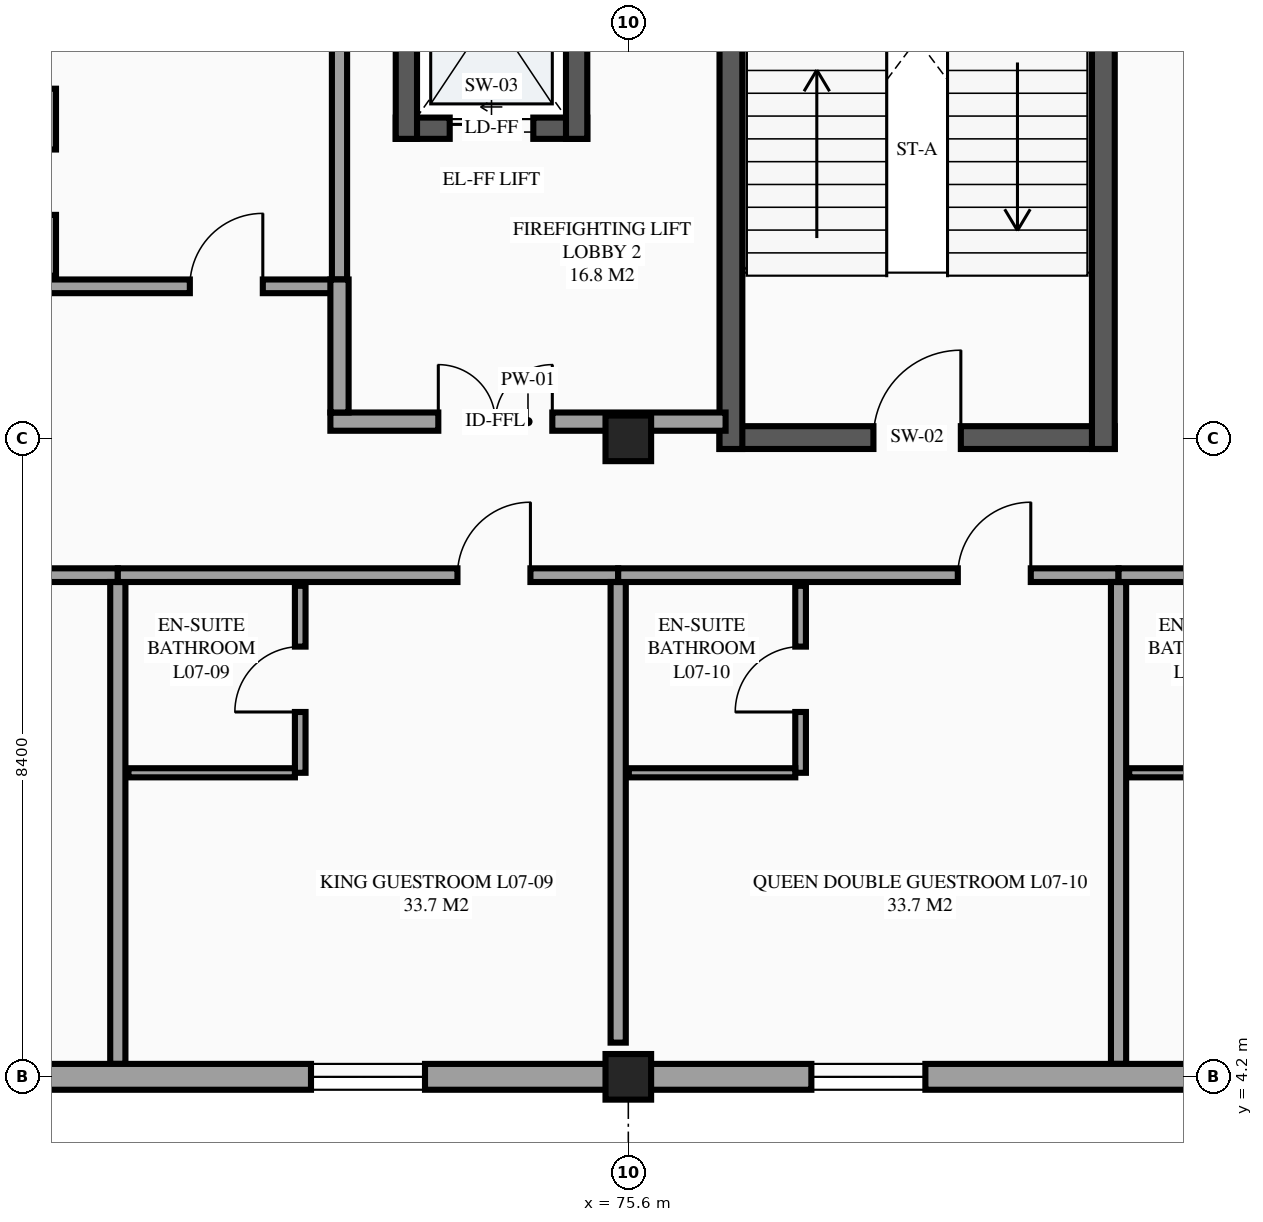
"""IFC4 building model, lengths in metres.
Left out: names, types, materials, properties, quantities, classifications, styles, units other than length and angle.
Written with IfcOpenShell. Run it as: python <this file> out.ifc"""

import sys

from ifc_helpers import new_model, si_unit, direction, frame, frame_2d, origin, origin_2d, place, context, subcontext, project, spatial, rectangle, extrude, element, fill, save


model = new_model("IFC4")
c1 = context("Model", 3, precision=1e-05, world=origin(), true_north=direction((0.0, 1.0)))
c2 = subcontext(c1, "Body", "Model", "MODEL_VIEW")
j1 = project(units=[si_unit("LENGTHUNIT", "METRE"), si_unit("PLANEANGLEUNIT", "RADIAN")], contexts=[c1])
p1 = place(None, origin())
s1 = spatial("IfcSite", under=j1, at=p1, CompositionType="ELEMENT")
p2 = place(p1, origin())
s2 = spatial("IfcBuilding", under=s1, at=p2, CompositionType="ELEMENT")
p3 = place(p2, frame((0.0, 0.0, 29.1)))
s3 = spatial("IfcBuildingStorey", under=s2, at=p3, CompositionType="ELEMENT", Elevation=29.1)
for number, where, z_axis, x_axis in (
    (1, (75.6, 4.2, 0.0), (0.0, 0.0, 1.0), (1.0, 0.0, 0.0)),
    (2, (75.6, 12.6, 0.0), (0.0, 0.0, 1.0), (1.0, 0.0, 0.0)),
):
    element("IfcColumn", number, at=place(p3, frame(where, z_axis=z_axis, x_axis=x_axis)), inside=s3, PredefinedType="COLUMN", context=c2, shape_type="SweptSolid", body=[
        extrude(rectangle(XDim=0.6, YDim=0.6, at=origin_2d()), origin(), (0.0, 0.0, 1.0), 3.6),
    ])
p4 = place(p3, frame((72.54, 16.68, 0.0), z_axis=(0.0, 0.0, 1.0), x_axis=(1.0, 0.0, 0.0)))
e3 = element("IfcWall", 3, at=p4, inside=s3, PredefinedType="SHEAR", context=c2, shape_type="SweptSolid", body=[
    extrude(rectangle(XDim=2.52, YDim=0.28, at=frame_2d((1.26, 0.0))), origin(), (0.0, 0.0, 1.0), 3.6),
])
p5 = place(p4, frame((0.71, 0.0, 0.0)))
e4 = element("IfcOpeningElement", 4, at=p5, cuts=e3, PredefinedType="OPENING", context=c2, shape_type="SweptSolid", body=[
    extrude(rectangle(XDim=1.1, YDim=2.2, at=frame_2d((0.55, 1.1))), frame((0.0, 0.15, 0.0), z_axis=(0.0, -1.0, 0.0), x_axis=(1.0, 0.0, 0.0)), (0.0, 0.0, 1.0), 0.3),
])
for number, where, z_axis, x_axis in (
    (5, (74.92, 16.54, 0.0), (0.0, 0.0, 1.0), (0.0, 1.0, 0.0)),
    (6, (72.68, 19.86, 0.0), (0.0, 0.0, 1.0), (0.0, -1.0, 0.0)),
):
    element("IfcWall", number, at=place(p3, frame(where, z_axis=z_axis, x_axis=x_axis)), inside=s3, PredefinedType="SHEAR", context=c2, shape_type="SweptSolid", body=[
        extrude(rectangle(XDim=3.32, YDim=0.28, at=frame_2d((1.66, 0.0))), origin(), (0.0, 0.0, 1.0), 3.6),
    ])
p6 = place(p3, frame((76.8, 12.61, 0.0), z_axis=(0.0, 0.0, 1.0), x_axis=(1.0, 0.0, 0.0)))
e7 = element("IfcWall", 7, at=p6, inside=s3, PredefinedType="SHEAR", context=c2, shape_type="SweptSolid", body=[
    extrude(rectangle(XDim=5.2, YDim=0.3, at=frame_2d((2.6, 0.0))), origin(), (0.0, 0.0, 1.0), 3.6),
])
p7 = place(p6, frame((2.025, 0.0, 0.0)))
e8 = element("IfcOpeningElement", 8, at=p7, cuts=e7, PredefinedType="OPENING", context=c2, shape_type="SweptSolid", body=[
    extrude(rectangle(XDim=1.15, YDim=2.15, at=frame_2d((0.575, 1.075))), frame((0.0, 0.16, 0.0), z_axis=(0.0, -1.0, 0.0), x_axis=(1.0, 0.0, 0.0)), (0.0, 0.0, 1.0), 0.32),
])
for number, where, z_axis, x_axis in (
    (9, (81.85, 12.46, 0.0), (0.0, 0.0, 1.0), (0.0, 1.0, 0.0)),
    (10, (76.95, 21.3, 0.0), (0.0, 0.0, 1.0), (0.0, -1.0, 0.0)),
):
    element("IfcWall", number, at=place(p3, frame(where, z_axis=z_axis, x_axis=x_axis)), inside=s3, PredefinedType="SHEAR", context=c2, shape_type="SweptSolid", body=[
        extrude(rectangle(XDim=8.84, YDim=0.3, at=frame_2d((4.42, 0.0))), origin(), (0.0, 0.0, 1.0), 3.6),
    ])
p8 = place(p3, frame((62.3, 10.8, 0.0), z_axis=(0.0, 0.0, 1.0), x_axis=(1.0, 0.0, 0.0)))
e11 = element("IfcWall", 11, at=p8, inside=s3, PredefinedType="PARTITIONING", context=c2, shape_type="SweptSolid", body=[
    extrude(rectangle(XDim=6.583, YDim=0.18, at=frame_2d((3.292, 0.0))), origin(), (0.0, 0.0, 1.0), 3.375),
])
p9 = place(p8, frame((3.069, 0.0, 0.0)))
e12 = element("IfcOpeningElement", 12, at=p9, cuts=e11, PredefinedType="OPENING", context=c2, shape_type="SweptSolid", body=[
    extrude(rectangle(XDim=0.96, YDim=2.15, at=frame_2d((0.48, 1.075))), frame((0.0, 0.1, 0.0), z_axis=(0.0, -1.0, 0.0), x_axis=(1.0, 0.0, 0.0)), (0.0, 0.0, 1.0), 0.2),
])
p10 = place(p3, frame((68.883, 4.37, 0.0), z_axis=(0.0, 0.0, 1.0), x_axis=(0.0, 1.0, 0.0)))
e13 = element("IfcWall", 13, at=p10, inside=s3, PredefinedType="PARTITIONING", context=c2, shape_type="SweptSolid", body=[
    extrude(rectangle(XDim=6.34, YDim=0.2, at=frame_2d((3.17, 0.0))), origin(), (0.0, 0.0, 1.0), 3.375),
])
p11 = place(p3, frame((68.883, 10.8, 0.0), z_axis=(0.0, 0.0, 1.0), x_axis=(1.0, 0.0, 0.0)))
e14 = element("IfcWall", 14, at=p11, inside=s3, PredefinedType="PARTITIONING", context=c2, shape_type="SweptSolid", body=[
    extrude(rectangle(XDim=6.583, YDim=0.18, at=frame_2d((3.292, 0.0))), origin(), (0.0, 0.0, 1.0), 3.375),
])
p12 = place(p11, frame((4.469, 0.0, 0.0)))
e15 = element("IfcOpeningElement", 15, at=p12, cuts=e14, PredefinedType="OPENING", context=c2, shape_type="SweptSolid", body=[
    extrude(rectangle(XDim=0.96, YDim=2.15, at=frame_2d((0.48, 1.075))), frame((0.0, 0.1, 0.0), z_axis=(0.0, -1.0, 0.0), x_axis=(1.0, 0.0, 0.0)), (0.0, 0.0, 1.0), 0.2),
])
p13 = place(p3, frame((75.467, 4.65, 0.0), z_axis=(0.0, 0.0, 1.0), x_axis=(0.0, 1.0, 0.0)))
e16 = element("IfcWall", 16, at=p13, inside=s3, PredefinedType="PARTITIONING", context=c2, shape_type="SweptSolid", body=[
    extrude(rectangle(XDim=6.06, YDim=0.2, at=frame_2d((3.03, 0.0))), origin(), (0.0, 0.0, 1.0), 2.78),
])
p14 = place(p3, frame((71.283, 8.2, 0.0), z_axis=(0.0, 0.0, 1.0), x_axis=(0.0, 1.0, 0.0)))
e17 = element("IfcWall", 17, at=p14, inside=s3, PredefinedType="PARTITIONING", context=c2, shape_type="SweptSolid", body=[
    extrude(rectangle(XDim=2.46, YDim=0.14, at=frame_2d((1.23, 0.0))), origin(), (0.0, 0.0, 1.0), 3.375),
])
p15 = place(p14, frame((0.8, 0.0, 0.0)))
e18 = element("IfcOpeningElement", 18, at=p15, cuts=e17, PredefinedType="OPENING", context=c2, shape_type="SweptSolid", body=[
    extrude(rectangle(XDim=0.86, YDim=2.1, at=frame_2d((0.43, 1.05))), frame((0.0, 0.08, 0.0), z_axis=(0.0, -1.0, 0.0), x_axis=(1.0, 0.0, 0.0)), (0.0, 0.0, 1.0), 0.16),
])
p16 = place(p3, frame((69.023, 8.2, 0.0), z_axis=(0.0, 0.0, 1.0), x_axis=(1.0, 0.0, 0.0)))
e19 = element("IfcWall", 19, at=p16, inside=s3, PredefinedType="PARTITIONING", context=c2, shape_type="SweptSolid", body=[
    extrude(rectangle(XDim=2.19, YDim=0.12, at=frame_2d((1.095, 0.0))), origin(), (0.0, 0.0, 1.0), 3.375),
])
p17 = place(p3, frame((75.467, 10.8, 0.0), z_axis=(0.0, 0.0, 1.0), x_axis=(1.0, 0.0, 0.0)))
e20 = element("IfcWall", 20, at=p17, inside=s3, PredefinedType="PARTITIONING", context=c2, shape_type="SweptSolid", body=[
    extrude(rectangle(XDim=6.583, YDim=0.18, at=frame_2d((3.292, 0.0))), origin(), (0.0, 0.0, 1.0), 3.375),
])
p18 = place(p17, frame((4.469, 0.0, 0.0)))
e21 = element("IfcOpeningElement", 21, at=p18, cuts=e20, PredefinedType="OPENING", context=c2, shape_type="SweptSolid", body=[
    extrude(rectangle(XDim=0.96, YDim=2.15, at=frame_2d((0.48, 1.075))), frame((0.0, 0.1, 0.0), z_axis=(0.0, -1.0, 0.0), x_axis=(1.0, 0.0, 0.0)), (0.0, 0.0, 1.0), 0.2),
])
p19 = place(p3, frame((82.05, 4.37, 0.0), z_axis=(0.0, 0.0, 1.0), x_axis=(0.0, 1.0, 0.0)))
e22 = element("IfcWall", 22, at=p19, inside=s3, PredefinedType="PARTITIONING", context=c2, shape_type="SweptSolid", body=[
    extrude(rectangle(XDim=6.34, YDim=0.2, at=frame_2d((3.17, 0.0))), origin(), (0.0, 0.0, 1.0), 3.375),
])
p20 = place(p3, frame((77.867, 8.2, 0.0), z_axis=(0.0, 0.0, 1.0), x_axis=(0.0, 1.0, 0.0)))
e23 = element("IfcWall", 23, at=p20, inside=s3, PredefinedType="PARTITIONING", context=c2, shape_type="SweptSolid", body=[
    extrude(rectangle(XDim=2.46, YDim=0.14, at=frame_2d((1.23, 0.0))), origin(), (0.0, 0.0, 1.0), 3.375),
])
p21 = place(p20, frame((0.8, 0.0, 0.0)))
e24 = element("IfcOpeningElement", 24, at=p21, cuts=e23, PredefinedType="OPENING", context=c2, shape_type="SweptSolid", body=[
    extrude(rectangle(XDim=0.86, YDim=2.1, at=frame_2d((0.43, 1.05))), frame((0.0, 0.08, 0.0), z_axis=(0.0, -1.0, 0.0), x_axis=(1.0, 0.0, 0.0)), (0.0, 0.0, 1.0), 0.16),
])
p22 = place(p3, frame((75.607, 8.2, 0.0), z_axis=(0.0, 0.0, 1.0), x_axis=(1.0, 0.0, 0.0)))
e25 = element("IfcWall", 25, at=p22, inside=s3, PredefinedType="PARTITIONING", context=c2, shape_type="SweptSolid", body=[
    extrude(rectangle(XDim=2.19, YDim=0.12, at=frame_2d((1.095, 0.0))), origin(), (0.0, 0.0, 1.0), 3.375),
])
p23 = place(p3, frame((82.05, 10.8, 0.0), z_axis=(0.0, 0.0, 1.0), x_axis=(1.0, 0.0, 0.0)))
e26 = element("IfcWall", 26, at=p23, inside=s3, PredefinedType="PARTITIONING", context=c2, shape_type="SweptSolid", body=[
    extrude(rectangle(XDim=6.583, YDim=0.18, at=frame_2d((3.292, 0.0))), origin(), (0.0, 0.0, 1.0), 3.375),
])
p24 = place(p23, frame((4.469, 0.0, 0.0)))
e27 = element("IfcOpeningElement", 27, at=p24, cuts=e26, PredefinedType="OPENING", context=c2, shape_type="SweptSolid", body=[
    extrude(rectangle(XDim=0.96, YDim=2.15, at=frame_2d((0.48, 1.075))), frame((0.0, 0.1, 0.0), z_axis=(0.0, -1.0, 0.0), x_axis=(1.0, 0.0, 0.0)), (0.0, 0.0, 1.0), 0.2),
])
p25 = place(p3, frame((82.19, 8.2, 0.0), z_axis=(0.0, 0.0, 1.0), x_axis=(1.0, 0.0, 0.0)))
e28 = element("IfcWall", 28, at=p25, inside=s3, PredefinedType="PARTITIONING", context=c2, shape_type="SweptSolid", body=[
    extrude(rectangle(XDim=2.19, YDim=0.12, at=frame_2d((1.095, 0.0))), origin(), (0.0, 0.0, 1.0), 3.375),
])
p26 = place(p3, frame((65.6, 14.6, 0.0), z_axis=(0.0, 0.0, 1.0), x_axis=(1.0, 0.0, 0.0)))
e29 = element("IfcWall", 29, at=p26, inside=s3, PredefinedType="PARTITIONING", context=c2, shape_type="SweptSolid", body=[
    extrude(rectangle(XDim=6.2, YDim=0.18, at=frame_2d((3.1, 0.0))), origin(), (0.0, 0.0, 1.0), 3.375),
])
p27 = place(p26, frame((4.231, 0.0, 0.0)))
e30 = element("IfcOpeningElement", 30, at=p27, cuts=e29, PredefinedType="OPENING", context=c2, shape_type="SweptSolid", body=[
    extrude(rectangle(XDim=0.96, YDim=2.15, at=frame_2d((0.48, 1.075))), frame((0.0, 0.1, 0.0), z_axis=(0.0, -1.0, 0.0), x_axis=(1.0, 0.0, 0.0)), (0.0, 0.0, 1.0), 0.2),
])
p28 = place(p3, frame((71.8, 14.69, 0.0), z_axis=(0.0, 0.0, 1.0), x_axis=(0.0, 1.0, 0.0)))
e31 = element("IfcWall", 31, at=p28, inside=s3, PredefinedType="PARTITIONING", context=c2, shape_type="SweptSolid", body=[
    extrude(rectangle(XDim=6.14, YDim=0.2, at=frame_2d((3.07, 0.0))), origin(), (0.0, 0.0, 1.0), 3.375),
])
p29 = place(p3, frame((68.0, 14.74, 0.0), z_axis=(0.0, 0.0, 1.0), x_axis=(0.0, 1.0, 0.0)))
e32 = element("IfcWall", 32, at=p29, inside=s3, PredefinedType="PARTITIONING", context=c2, shape_type="SweptSolid", body=[
    extrude(rectangle(XDim=2.46, YDim=0.14, at=frame_2d((1.23, 0.0))), origin(), (0.0, 0.0, 1.0), 3.375),
])
p30 = place(p29, frame((0.8, 0.0, 0.0)))
e33 = element("IfcOpeningElement", 33, at=p30, cuts=e32, PredefinedType="OPENING", context=c2, shape_type="SweptSolid", body=[
    extrude(rectangle(XDim=0.86, YDim=2.1, at=frame_2d((0.43, 1.05))), frame((0.0, 0.08, 0.0), z_axis=(0.0, -1.0, 0.0), x_axis=(1.0, 0.0, 0.0)), (0.0, 0.0, 1.0), 0.16),
])
p31 = place(p3, frame((71.68, 12.82, 0.0), z_axis=(0.0, 0.0, 1.0), x_axis=(1.0, 0.0, 0.0)))
e34 = element("IfcWall", 34, at=p31, inside=s3, PredefinedType="PARTITIONING", context=c2, shape_type="SweptSolid", body=[
    extrude(rectangle(XDim=5.2, YDim=0.24, at=frame_2d((2.6, 0.0))), origin(), (0.0, 0.0, 1.0), 2.53),
])
p32 = place(p31, frame((1.42, 0.0, 0.0)))
e35 = element("IfcOpeningElement", 35, at=p32, cuts=e34, PredefinedType="OPENING", context=c2, shape_type="SweptSolid", body=[
    extrude(rectangle(XDim=1.5, YDim=2.15, at=frame_2d((0.75, 1.075))), frame((0.0, 0.13, 0.0), z_axis=(0.0, -1.0, 0.0), x_axis=(1.0, 0.0, 0.0)), (0.0, 0.0, 1.0), 0.26),
])
p33 = place(p3, frame((71.8, 12.94, 0.0), z_axis=(0.0, 0.0, 1.0), x_axis=(0.0, 1.0, 0.0)))
e36 = element("IfcWall", 36, at=p33, inside=s3, PredefinedType="PARTITIONING", context=c2, shape_type="SweptSolid", body=[
    extrude(rectangle(XDim=1.75, YDim=0.24, at=frame_2d((0.875, 0.0))), origin(), (0.0, 0.0, 1.0), 3.375),
])
p34 = place(p3, frame((67.2, 4.2, 0.0), z_axis=(0.0, 0.0, 1.0), x_axis=(1.0, 0.0, 0.0)))
e37 = element("IfcWall", 37, at=p34, inside=s3, PredefinedType="STANDARD", context=c2, shape_type="SweptSolid", body=[
    extrude(rectangle(XDim=8.4, YDim=0.34, at=frame_2d((4.2, 0.0))), origin(), (0.0, 0.0, 1.0), 3.075),
])
p35 = place(p34, frame((4.225, 0.0, 0.85)))
e38 = element("IfcOpeningElement", 38, at=p35, cuts=e37, PredefinedType="OPENING", context=c2, shape_type="SweptSolid", body=[
    extrude(rectangle(XDim=1.5, YDim=1.5, at=frame_2d((0.75, 0.75))), frame((0.0, 0.18, 0.0), z_axis=(0.0, -1.0, 0.0), x_axis=(1.0, 0.0, 0.0)), (0.0, 0.0, 1.0), 0.36),
])
p36 = place(p3, frame((75.6, 4.2, 0.0), z_axis=(0.0, 0.0, 1.0), x_axis=(1.0, 0.0, 0.0)))
e39 = element("IfcWall", 39, at=p36, inside=s3, PredefinedType="STANDARD", context=c2, shape_type="SweptSolid", body=[
    extrude(rectangle(XDim=8.4, YDim=0.34, at=frame_2d((4.2, 0.0))), origin(), (0.0, 0.0, 1.0), 2.78),
])
p37 = place(p36, frame((2.408, 0.0, 0.85)))
e40 = element("IfcOpeningElement", 40, at=p37, cuts=e39, PredefinedType="OPENING", context=c2, shape_type="SweptSolid", body=[
    extrude(rectangle(XDim=1.5, YDim=1.5, at=frame_2d((0.75, 0.75))), frame((0.0, 0.18, 0.0), z_axis=(0.0, -1.0, 0.0), x_axis=(1.0, 0.0, 0.0)), (0.0, 0.0, 1.0), 0.36),
])
p38 = place(p35, origin())
e41 = element("IfcWindow", 41, at=p38, inside=s3, PartitioningType="SINGLE_PANEL", PredefinedType="WINDOW", context=c2, shape_type="SweptSolid", body=[
    extrude(rectangle(XDim=1.5, YDim=1.5, at=frame_2d((0.75, 0.75))), frame((0.0, 0.03, 0.0), z_axis=(0.0, -1.0, 0.0), x_axis=(1.0, 0.0, 0.0)), (0.0, 0.0, 1.0), 0.06),
])
fill(e38, e41)
p39 = place(p37, origin())
e42 = element("IfcWindow", 42, at=p39, inside=s3, PartitioningType="SINGLE_PANEL", PredefinedType="WINDOW", context=c2, shape_type="SweptSolid", body=[
    extrude(rectangle(XDim=1.5, YDim=1.5, at=frame_2d((0.75, 0.75))), frame((0.0, 0.03, 0.0), z_axis=(0.0, -1.0, 0.0), x_axis=(1.0, 0.0, 0.0)), (0.0, 0.0, 1.0), 0.06),
])
fill(e40, e42)
p40 = place(p5, origin())
e43 = element("IfcDoor", 43, at=p40, inside=s3, OperationType="SLIDING_TO_LEFT", PredefinedType="DOOR", context=c2, shape_type="SweptSolid", body=[
    extrude(rectangle(XDim=1.1, YDim=2.2, at=frame_2d((0.55, 1.1))), frame((0.0, 0.025, 0.0), z_axis=(0.0, -1.0, 0.0), x_axis=(1.0, 0.0, 0.0)), (0.0, 0.0, 1.0), 0.05),
])
fill(e4, e43)
p41 = place(p7, origin())
e44 = element("IfcDoor", 44, at=p41, inside=s3, OperationType="SINGLE_SWING_RIGHT", PredefinedType="DOOR", context=c2, shape_type="SweptSolid", body=[
    extrude(rectangle(XDim=1.15, YDim=2.15, at=frame_2d((0.575, 1.075))), frame((0.0, 0.025, 0.0), z_axis=(0.0, -1.0, 0.0), x_axis=(1.0, 0.0, 0.0)), (0.0, 0.0, 1.0), 0.05),
])
fill(e8, e44)
p42 = place(p12, origin())
e45 = element("IfcDoor", 45, at=p42, inside=s3, OperationType="SINGLE_SWING_RIGHT", PredefinedType="DOOR", context=c2, shape_type="SweptSolid", body=[
    extrude(rectangle(XDim=0.96, YDim=2.15, at=frame_2d((0.48, 1.075))), frame((0.0, 0.025, 0.0), z_axis=(0.0, -1.0, 0.0), x_axis=(1.0, 0.0, 0.0)), (0.0, 0.0, 1.0), 0.05),
])
fill(e15, e45)
p43 = place(p15, origin())
e46 = element("IfcDoor", 46, at=p43, inside=s3, OperationType="SINGLE_SWING_LEFT", PredefinedType="DOOR", context=c2, shape_type="SweptSolid", body=[
    extrude(rectangle(XDim=0.86, YDim=2.1, at=frame_2d((0.43, 1.05))), frame((0.0, 0.025, 0.0), z_axis=(0.0, -1.0, 0.0), x_axis=(1.0, 0.0, 0.0)), (0.0, 0.0, 1.0), 0.05),
])
fill(e18, e46)
p44 = place(p18, origin())
e47 = element("IfcDoor", 47, at=p44, inside=s3, OperationType="SINGLE_SWING_RIGHT", PredefinedType="DOOR", context=c2, shape_type="SweptSolid", body=[
    extrude(rectangle(XDim=0.96, YDim=2.15, at=frame_2d((0.48, 1.075))), frame((0.0, 0.025, 0.0), z_axis=(0.0, -1.0, 0.0), x_axis=(1.0, 0.0, 0.0)), (0.0, 0.0, 1.0), 0.05),
])
fill(e21, e47)
p45 = place(p21, origin())
e48 = element("IfcDoor", 48, at=p45, inside=s3, OperationType="SINGLE_SWING_LEFT", PredefinedType="DOOR", context=c2, shape_type="SweptSolid", body=[
    extrude(rectangle(XDim=0.86, YDim=2.1, at=frame_2d((0.43, 1.05))), frame((0.0, 0.025, 0.0), z_axis=(0.0, -1.0, 0.0), x_axis=(1.0, 0.0, 0.0)), (0.0, 0.0, 1.0), 0.05),
])
fill(e24, e48)
p46 = place(p27, origin())
e49 = element("IfcDoor", 49, at=p46, inside=s3, OperationType="SINGLE_SWING_RIGHT", PredefinedType="DOOR", context=c2, shape_type="SweptSolid", body=[
    extrude(rectangle(XDim=0.96, YDim=2.15, at=frame_2d((0.48, 1.075))), frame((0.0, 0.025, 0.0), z_axis=(0.0, -1.0, 0.0), x_axis=(1.0, 0.0, 0.0)), (0.0, 0.0, 1.0), 0.05),
])
fill(e30, e49)
p47 = place(p30, origin())
e50 = element("IfcDoor", 50, at=p47, inside=s3, OperationType="SINGLE_SWING_LEFT", PredefinedType="DOOR", context=c2, shape_type="SweptSolid", body=[
    extrude(rectangle(XDim=0.86, YDim=2.1, at=frame_2d((0.43, 1.05))), frame((0.0, 0.025, 0.0), z_axis=(0.0, -1.0, 0.0), x_axis=(1.0, 0.0, 0.0)), (0.0, 0.0, 1.0), 0.05),
])
fill(e33, e50)
p48 = place(p32, origin())
e51 = element("IfcDoor", 51, at=p48, inside=s3, OperationType="DOUBLE_DOOR_SINGLE_SWING", PredefinedType="DOOR", context=c2, shape_type="SweptSolid", body=[
    extrude(rectangle(XDim=1.5, YDim=2.15, at=frame_2d((0.75, 1.075))), frame((0.0, 0.025, 0.0), z_axis=(0.0, -1.0, 0.0), x_axis=(1.0, 0.0, 0.0)), (0.0, 0.0, 1.0), 0.05),
])
fill(e35, e51)
save(model, sys.argv[1])
